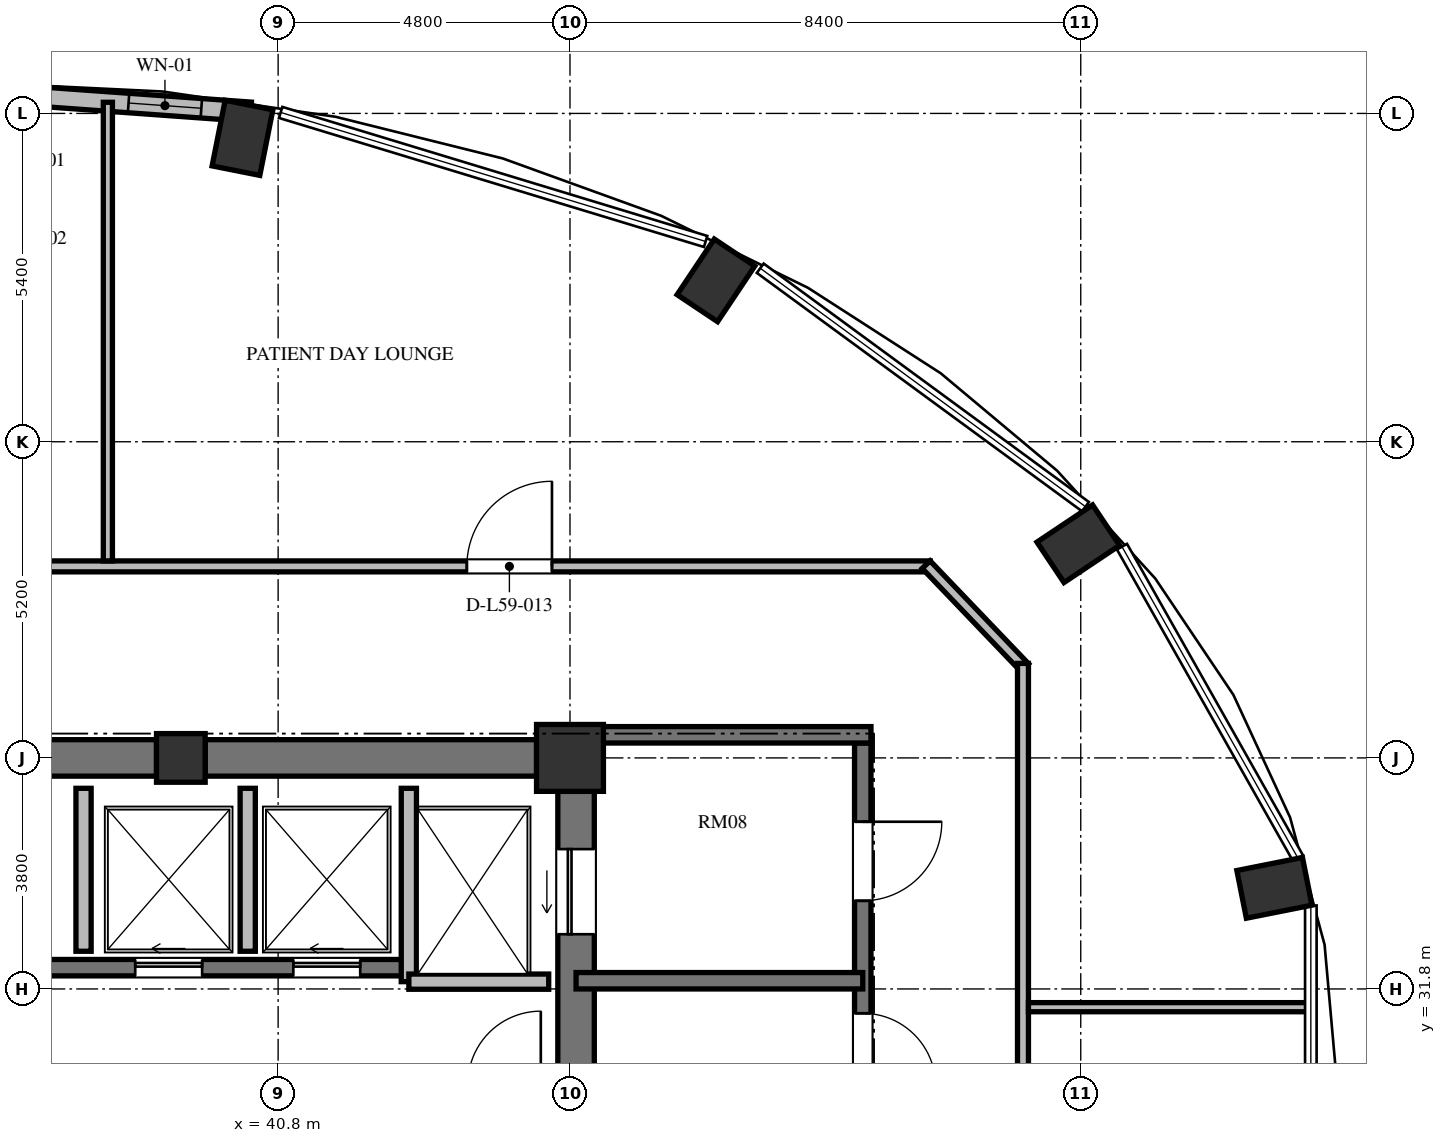
"""IFC4 building model, lengths in metres.
Left out: names, types, materials, properties, quantities, classifications, styles, units other than length and angle.
Written with IfcOpenShell. Run it as: python <this file> out.ifc"""

import sys

from ifc_helpers import new_model, si_unit, direction, frame, frame_2d, origin, origin_2d, place, context, subcontext, project, spatial, rectangle, extrude, element, fill, save


model = new_model("IFC4")
c1 = context("Model", 3, precision=1e-05, world=origin(), true_north=direction((0.0, 1.0)))
c2 = subcontext(c1, "Body", "Model", "MODEL_VIEW")
j1 = project(units=[si_unit("LENGTHUNIT", "METRE"), si_unit("PLANEANGLEUNIT", "RADIAN")], contexts=[c1])
p1 = place(None, origin())
s1 = spatial("IfcSite", under=j1, at=p1, CompositionType="ELEMENT")
p2 = place(p1, origin())
s2 = spatial("IfcBuilding", under=s1, at=p2, CompositionType="ELEMENT")
p3 = place(p2, frame((0.0, 0.0, 227.664)))
s3 = spatial("IfcBuildingStorey", under=s2, at=p3, CompositionType="ELEMENT", Elevation=227.664)
for number, where, z_axis, x_axis in (
    (1, (57.185, 33.463, 0.0), (0.0, 0.0, 1.0), (0.981, 0.195, 0.0)),
    (2, (53.96, 39.123, 0.0), (0.0, 0.0, 1.0), (0.831, 0.556, 0.0)),
    (3, (48.0, 43.454, 0.0), (0.0, 0.0, 1.0), (0.556, 0.831, 0.0)),
    (4, (40.214, 45.798, 0.0), (0.0, 0.0, 1.0), (0.195, 0.981, 0.0)),
):
    element("IfcColumn", number, at=place(p3, frame(where, z_axis=z_axis, x_axis=x_axis)), inside=s3, PredefinedType="COLUMN", context=c2, shape_type="SweptSolid", body=[
        extrude(rectangle(XDim=1.1, YDim=0.8, at=origin_2d()), origin(), (0.0, 0.0, 1.0), 3.648),
    ])
p4 = place(p3, frame((45.6, 35.6, 0.0), z_axis=(0.0, 0.0, 1.0), x_axis=(1.0, 0.0, 0.0)))
e5 = element("IfcColumn", 5, at=p4, inside=s3, PredefinedType="COLUMN", context=c2, shape_type="SweptSolid", body=[
    extrude(rectangle(XDim=1.1, YDim=1.1, at=origin_2d()), origin(), (0.0, 0.0, 1.0), 3.648),
])
p5 = place(p3, frame((39.2, 35.6, 0.0), z_axis=(0.0, 0.0, 1.0), x_axis=(1.0, 0.0, 0.0)))
e6 = element("IfcColumn", 6, at=p5, inside=s3, PredefinedType="COLUMN", context=c2, shape_type="SweptSolid", body=[
    extrude(rectangle(XDim=0.8, YDim=0.8, at=origin_2d()), origin(), (0.0, 0.0, 1.0), 3.648),
])
p6 = place(p3, frame((45.7, 20.95, 0.0), z_axis=(0.0, 0.0, 1.0), x_axis=(0.0, 1.0, 0.0)))
e7 = element("IfcWall", 7, at=p6, inside=s3, PredefinedType="SHEAR", context=c2, shape_type="SweptSolid", body=[
    extrude(rectangle(XDim=14.1, YDim=0.6, at=frame_2d((7.05, 0.0))), origin(), (0.0, 0.0, 1.0), 3.648),
])
p7 = place(p6, frame((11.75, 0.0, 0.0)))
e8 = element("IfcOpeningElement", 8, at=p7, cuts=e7, PredefinedType="OPENING", context=c2, shape_type="SweptSolid", body=[
    extrude(rectangle(XDim=1.4, YDim=2.3, at=frame_2d((0.7, 1.15))), frame((0.0, 0.31, 0.0), z_axis=(0.0, -1.0, 0.0), x_axis=(1.0, 0.0, 0.0)), (0.0, 0.0, 1.0), 0.62),
])
p8 = place(p6, frame((0.95, 0.0, 0.0)))
e9 = element("IfcOpeningElement", 9, at=p8, cuts=e7, PredefinedType="OPENING", context=c2, shape_type="SweptSolid", body=[
    extrude(rectangle(XDim=1.4, YDim=2.3, at=frame_2d((0.7, 1.15))), frame((0.0, 0.31, 0.0), z_axis=(0.0, -1.0, 0.0), x_axis=(1.0, 0.0, 0.0)), (0.0, 0.0, 1.0), 0.62),
])
p9 = place(p3, frame((33.2, 35.6, 0.0), z_axis=(0.0, 0.0, 1.0), x_axis=(1.0, 0.0, 0.0)))
e10 = element("IfcWall", 10, at=p9, inside=s3, PredefinedType="SHEAR", context=c2, shape_type="SweptSolid", body=[
    extrude(rectangle(XDim=5.6, YDim=0.6, at=frame_2d((2.8, 0.0))), origin(), (0.0, 0.0, 1.0), 3.648),
])
p10 = place(p3, frame((39.6, 35.6, 0.0), z_axis=(0.0, 0.0, 1.0), x_axis=(1.0, 0.0, 0.0)))
e11 = element("IfcWall", 11, at=p10, inside=s3, PredefinedType="SHEAR", context=c2, shape_type="SweptSolid", body=[
    extrude(rectangle(XDim=5.45, YDim=0.6, at=frame_2d((2.725, 0.0))), origin(), (0.0, 0.0, 1.0), 3.648),
])
p11 = place(p3, frame((40.35, 46.226, 0.0), z_axis=(0.0, 0.0, 1.0), x_axis=(-0.997409061056, 0.071938619141, 0.0)))
e12 = element("IfcWall", 12, at=p11, inside=s3, PredefinedType="SOLIDWALL", context=c2, shape_type="SweptSolid", body=[
    extrude(rectangle(XDim=4.541, YDim=0.32, at=frame_2d((2.271, 0.0))), origin(), (0.0, 0.0, 1.0), 3.448),
])
p12 = place(p11, frame((0.815, 0.0, 0.85)))
e13 = element("IfcOpeningElement", 13, at=p12, cuts=e12, PredefinedType="OPENING", context=c2, shape_type="SweptSolid", body=[
    extrude(rectangle(XDim=1.2, YDim=2.2, at=frame_2d((0.6, 1.1))), frame((0.0, 0.17, 0.0), z_axis=(0.0, -1.0, 0.0), x_axis=(1.0, 0.0, 0.0)), (0.0, 0.0, 1.0), 0.34),
])
p13 = place(p3, frame((26.55, 32.15, 0.0), z_axis=(0.0, 0.0, 1.0), x_axis=(1.0, 0.0, 0.0)))
e14 = element("IfcWall", 14, at=p13, inside=s3, PredefinedType="SHEAR", context=c2, shape_type="SweptSolid", body=[
    extrude(rectangle(XDim=16.4, YDim=0.27, at=frame_2d((8.2, 0.0))), origin(), (0.0, 0.0, 1.0), 3.648),
])
p14 = place(p13, frame((2.175, 0.0, 0.0)))
e15 = element("IfcOpeningElement", 15, at=p14, cuts=e14, PredefinedType="OPENING", context=c2, shape_type="SweptSolid", body=[
    extrude(rectangle(XDim=1.05, YDim=2.15, at=frame_2d((0.525, 1.075))), frame((0.0, 0.145, 0.0), z_axis=(0.0, -1.0, 0.0), x_axis=(1.0, 0.0, 0.0)), (0.0, 0.0, 1.0), 0.29),
])
p15 = place(p13, frame((7.575, 0.0, 0.0)))
e16 = element("IfcOpeningElement", 16, at=p15, cuts=e14, PredefinedType="OPENING", context=c2, shape_type="SweptSolid", body=[
    extrude(rectangle(XDim=1.05, YDim=2.15, at=frame_2d((0.525, 1.075))), frame((0.0, 0.145, 0.0), z_axis=(0.0, -1.0, 0.0), x_axis=(1.0, 0.0, 0.0)), (0.0, 0.0, 1.0), 0.29),
])
p16 = place(p13, frame((11.9, 0.0, 0.0)))
e17 = element("IfcOpeningElement", 17, at=p16, cuts=e14, PredefinedType="OPENING", context=c2, shape_type="SweptSolid", body=[
    extrude(rectangle(XDim=1.1, YDim=2.2, at=frame_2d((0.55, 1.1))), frame((0.0, 0.145, 0.0), z_axis=(0.0, -1.0, 0.0), x_axis=(1.0, 0.0, 0.0)), (0.0, 0.0, 1.0), 0.29),
])
p17 = place(p13, frame((14.5, 0.0, 0.0)))
e18 = element("IfcOpeningElement", 18, at=p17, cuts=e14, PredefinedType="OPENING", context=c2, shape_type="SweptSolid", body=[
    extrude(rectangle(XDim=1.1, YDim=2.2, at=frame_2d((0.55, 1.1))), frame((0.0, 0.145, 0.0), z_axis=(0.0, -1.0, 0.0), x_axis=(1.0, 0.0, 0.0)), (0.0, 0.0, 1.0), 0.29),
])
p18 = place(p3, frame((42.95, 31.92, 0.0), z_axis=(0.0, 0.0, 1.0), x_axis=(0.0, 1.0, 0.0)))
e19 = element("IfcWall", 19, at=p18, inside=s3, PredefinedType="SOLIDWALL", context=c2, shape_type="SweptSolid", body=[
    extrude(rectangle(XDim=3.18, YDim=0.25, at=frame_2d((1.59, 0.0))), origin(), (0.0, 0.0, 1.0), 3.448),
])
p19 = place(p3, frame((42.95, 31.92, 0.0), z_axis=(0.0, 0.0, 1.0), x_axis=(1.0, 0.0, 0.0)))
e20 = element("IfcWall", 20, at=p19, inside=s3, PredefinedType="SOLIDWALL", context=c2, shape_type="SweptSolid", body=[
    extrude(rectangle(XDim=2.3, YDim=0.25, at=frame_2d((1.15, 0.0))), origin(), (0.0, 0.0, 1.0), 3.448),
])
for number, where, z_axis, x_axis in (
    (21, (37.6, 32.42, 0.0), (0.0, 0.0, 1.0), (0.0, 1.0, 0.0)),
    (22, (40.3, 32.42, 0.0), (0.0, 0.0, 1.0), (0.0, 1.0, 0.0)),
):
    element("IfcWall", number, at=place(p3, frame(where, z_axis=z_axis, x_axis=x_axis)), inside=s3, PredefinedType="SOLIDWALL", context=c2, shape_type="SweptSolid", body=[
        extrude(rectangle(XDim=2.68, YDim=0.25, at=frame_2d((1.34, 0.0))), origin(), (0.0, 0.0, 1.0), 3.448),
    ])
p20 = place(p3, frame((50.415, 35.845, 0.0), z_axis=(0.0, 0.0, 1.0), x_axis=(0.0, -1.0, 0.0)))
e23 = element("IfcWall", 23, at=p20, inside=s3, PredefinedType="SHEAR", context=c2, shape_type="SweptSolid", body=[
    extrude(rectangle(XDim=15.825, YDim=0.27, at=frame_2d((7.913, 0.0))), origin(), (0.0, 0.0, 1.0), 3.648),
])
p21 = place(p20, frame((4.445, 0.0, 0.0)))
e24 = element("IfcOpeningElement", 24, at=p21, cuts=e23, PredefinedType="OPENING", context=c2, shape_type="SweptSolid", body=[
    extrude(rectangle(XDim=1.2, YDim=2.15, at=frame_2d((0.6, 1.075))), frame((0.0, 0.145, 0.0), z_axis=(0.0, -1.0, 0.0), x_axis=(1.0, 0.0, 0.0)), (0.0, 0.0, 1.0), 0.29),
])
p22 = place(p20, frame((1.295, 0.0, 0.0)))
e25 = element("IfcOpeningElement", 25, at=p22, cuts=e23, PredefinedType="OPENING", context=c2, shape_type="SweptSolid", body=[
    extrude(rectangle(XDim=1.3, YDim=2.2, at=frame_2d((0.65, 1.1))), frame((0.0, 0.145, 0.0), z_axis=(0.0, -1.0, 0.0), x_axis=(1.0, 0.0, 0.0)), (0.0, 0.0, 1.0), 0.29),
])
p23 = place(p20, frame((13.095, 0.0, 0.0)))
e26 = element("IfcOpeningElement", 26, at=p23, cuts=e23, PredefinedType="OPENING", context=c2, shape_type="SweptSolid", body=[
    extrude(rectangle(XDim=1.3, YDim=2.2, at=frame_2d((0.65, 1.1))), frame((0.0, 0.145, 0.0), z_axis=(0.0, -1.0, 0.0), x_axis=(1.0, 0.0, 0.0)), (0.0, 0.0, 1.0), 0.29),
])
p24 = place(p3, frame((46.0, 35.98, 0.0), z_axis=(0.0, 0.0, 1.0), x_axis=(1.0, 0.0, 0.0)))
e27 = element("IfcWall", 27, at=p24, inside=s3, PredefinedType="SHEAR", context=c2, shape_type="SweptSolid", body=[
    extrude(rectangle(XDim=4.55, YDim=0.27, at=frame_2d((2.275, 0.0))), origin(), (0.0, 0.0, 1.0), 3.648),
])
p25 = place(p3, frame((45.7, 31.935, 0.0), z_axis=(0.0, 0.0, 1.0), x_axis=(1.0, 0.0, 0.0)))
e28 = element("IfcWall", 28, at=p25, inside=s3, PredefinedType="SHEAR", context=c2, shape_type="SweptSolid", body=[
    extrude(rectangle(XDim=4.715, YDim=0.27, at=frame_2d((2.357, 0.0))), origin(), (0.0, 0.0, 1.0), 3.648),
])
p26 = place(p3, frame((30.71, 38.75, 0.0), z_axis=(0.0, 0.0, 1.0), x_axis=(1.0, 0.0, 0.0)))
e29 = element("IfcWall", 29, at=p26, inside=s3, PredefinedType="PARTITIONING", context=c2, shape_type="SweptSolid", body=[
    extrude(rectangle(XDim=20.815, YDim=0.18, at=frame_2d((10.408, 0.0))), origin(), (0.0, 0.0, 1.0), 3.073),
])
p27 = place(p26, frame((13.194, 0.0, 0.0)))
e30 = element("IfcOpeningElement", 30, at=p27, cuts=e29, PredefinedType="OPENING", context=c2, shape_type="SweptSolid", body=[
    extrude(rectangle(XDim=1.4, YDim=2.2, at=frame_2d((0.7, 1.1))), frame((0.0, 0.1, 0.0), z_axis=(0.0, -1.0, 0.0), x_axis=(1.0, 0.0, 0.0)), (0.0, 0.0, 1.0), 0.2),
])
p28 = place(p26, frame((3.279, 0.0, 0.0)))
e31 = element("IfcOpeningElement", 31, at=p28, cuts=e29, PredefinedType="OPENING", context=c2, shape_type="SweptSolid", body=[
    extrude(rectangle(XDim=1.05, YDim=2.15, at=frame_2d((0.525, 1.075))), frame((0.0, 0.1, 0.0), z_axis=(0.0, -1.0, 0.0), x_axis=(1.0, 0.0, 0.0)), (0.0, 0.0, 1.0), 0.2),
])
p29 = place(p3, frame((51.458, 38.779, 0.0), z_axis=(0.0, 0.0, 1.0), x_axis=(0.691359830363, -0.722510612352, 0.0)))
e32 = element("IfcWall", 32, at=p29, inside=s3, PredefinedType="PARTITIONING", context=c2, shape_type="SweptSolid", body=[
    extrude(rectangle(XDim=2.343, YDim=0.18, at=frame_2d((1.172, 0.0))), origin(), (0.0, 0.0, 1.0), 3.033),
])
p30 = place(p3, frame((53.05, 37.155, 0.0), z_axis=(0.0, 0.0, 1.0), x_axis=(0.0, -1.0, 0.0)))
e33 = element("IfcWall", 33, at=p30, inside=s3, PredefinedType="PARTITIONING", context=c2, shape_type="SweptSolid", body=[
    extrude(rectangle(XDim=13.509, YDim=0.18, at=frame_2d((6.754, 0.0))), origin(), (0.0, 0.0, 1.0), 3.448),
])
p31 = place(p30, frame((8.629, 0.0, 0.0)))
e34 = element("IfcOpeningElement", 34, at=p31, cuts=e33, PredefinedType="OPENING", context=c2, shape_type="SweptSolid", body=[
    extrude(rectangle(XDim=1.05, YDim=2.15, at=frame_2d((0.525, 1.075))), frame((0.0, 0.1, 0.0), z_axis=(0.0, -1.0, 0.0), x_axis=(1.0, 0.0, 0.0)), (0.0, 0.0, 1.0), 0.2),
])
p32 = place(p3, frame((53.14, 31.5, 0.0), z_axis=(0.0, 0.0, 1.0), x_axis=(1.0, 0.0, 0.0)))
e35 = element("IfcWall", 35, at=p32, inside=s3, PredefinedType="PARTITIONING", context=c2, shape_type="SweptSolid", body=[
    extrude(rectangle(XDim=4.632, YDim=0.15, at=frame_2d((2.316, 0.0))), origin(), (0.0, 0.0, 1.0), 3.448),
])
p33 = place(p3, frame((38.0, 38.84, 0.0), z_axis=(0.0, 0.0, 1.0), x_axis=(0.0, 1.0, 0.0)))
e36 = element("IfcWall", 36, at=p33, inside=s3, PredefinedType="PARTITIONING", context=c2, shape_type="SweptSolid", body=[
    extrude(rectangle(XDim=7.543, YDim=0.15, at=frame_2d((3.771, 0.0))), origin(), (0.0, 0.0, 1.0), 3.448),
])
p34 = place(p12, origin())
e37 = element("IfcWindow", 37, at=p34, inside=s3, PartitioningType="SINGLE_PANEL", PredefinedType="WINDOW", context=c2, shape_type="SweptSolid", body=[
    extrude(rectangle(XDim=1.2, YDim=2.2, at=frame_2d((0.6, 1.1))), frame((0.0, 0.03, 0.0), z_axis=(0.0, -1.0, 0.0), x_axis=(1.0, 0.0, 0.0)), (0.0, 0.0, 1.0), 0.06),
])
fill(e13, e37)
p35 = place(p16, origin())
e38 = element("IfcDoor", 38, at=p35, inside=s3, OperationType="SLIDING_TO_LEFT", PredefinedType="DOOR", context=c2, shape_type="SweptSolid", body=[
    extrude(rectangle(XDim=1.1, YDim=2.2, at=frame_2d((0.55, 1.1))), frame((0.0, 0.025, 0.0), z_axis=(0.0, -1.0, 0.0), x_axis=(1.0, 0.0, 0.0)), (0.0, 0.0, 1.0), 0.05),
])
fill(e17, e38)
p36 = place(p17, origin())
e39 = element("IfcDoor", 39, at=p36, inside=s3, OperationType="SLIDING_TO_LEFT", PredefinedType="DOOR", context=c2, shape_type="SweptSolid", body=[
    extrude(rectangle(XDim=1.1, YDim=2.2, at=frame_2d((0.55, 1.1))), frame((0.0, 0.025, 0.0), z_axis=(0.0, -1.0, 0.0), x_axis=(1.0, 0.0, 0.0)), (0.0, 0.0, 1.0), 0.05),
])
fill(e18, e39)
p37 = place(p7, origin())
e40 = element("IfcDoor", 40, at=p37, inside=s3, OperationType="SLIDING_TO_LEFT", PredefinedType="DOOR", context=c2, shape_type="SweptSolid", body=[
    extrude(rectangle(XDim=1.4, YDim=2.3, at=frame_2d((0.7, 1.15))), frame((0.0, 0.025, 0.0), z_axis=(0.0, -1.0, 0.0), x_axis=(1.0, 0.0, 0.0)), (0.0, 0.0, 1.0), 0.05),
])
fill(e8, e40)
p38 = place(p21, origin())
e41 = element("IfcDoor", 41, at=p38, inside=s3, OperationType="SINGLE_SWING_RIGHT", PredefinedType="DOOR", context=c2, shape_type="SweptSolid", body=[
    extrude(rectangle(XDim=1.2, YDim=2.15, at=frame_2d((0.6, 1.075))), frame((0.0, 0.025, 0.0), z_axis=(0.0, -1.0, 0.0), x_axis=(1.0, 0.0, 0.0)), (0.0, 0.0, 1.0), 0.05),
])
fill(e24, e41)
p39 = place(p22, origin())
e42 = element("IfcDoor", 42, at=p39, inside=s3, OperationType="SINGLE_SWING_LEFT", PredefinedType="DOOR", context=c2, shape_type="SweptSolid", body=[
    extrude(rectangle(XDim=1.3, YDim=2.2, at=frame_2d((0.65, 1.1))), frame((0.0, 0.025, 0.0), z_axis=(0.0, -1.0, 0.0), x_axis=(1.0, 0.0, 0.0)), (0.0, 0.0, 1.0), 0.05),
])
fill(e25, e42)
p40 = place(p27, origin())
e43 = element("IfcDoor", 43, at=p40, inside=s3, OperationType="SINGLE_SWING_RIGHT", PredefinedType="DOOR", context=c2, shape_type="SweptSolid", body=[
    extrude(rectangle(XDim=1.4, YDim=2.2, at=frame_2d((0.7, 1.1))), frame((0.0, 0.025, 0.0), z_axis=(0.0, -1.0, 0.0), x_axis=(1.0, 0.0, 0.0)), (0.0, 0.0, 1.0), 0.05),
])
fill(e30, e43)
save(model, sys.argv[1])
